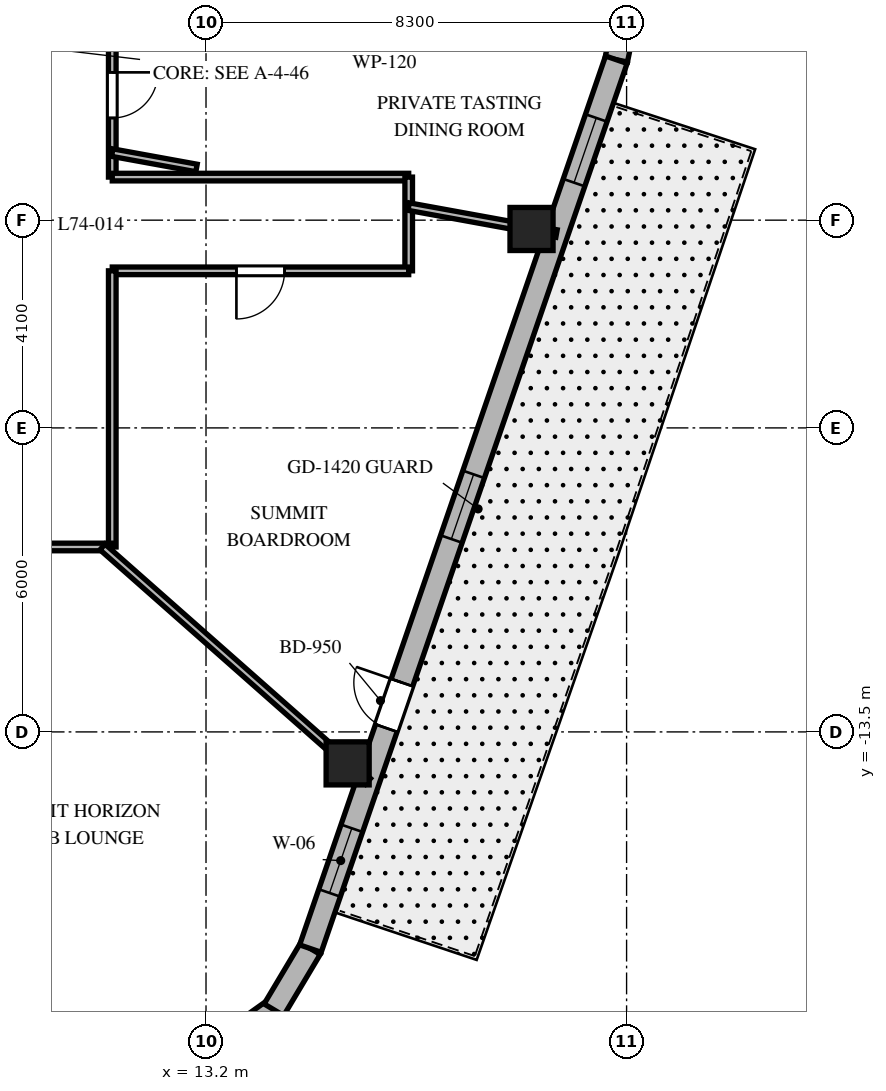
"""IFC4 building model, lengths in metres.
Left out: names, types, materials, properties, quantities, classifications, styles, units other than length and angle.
Written with IfcOpenShell. Run it as: python <this file> out.ifc"""

import sys

from ifc_helpers import new_model, si_unit, direction, frame, frame_2d, origin, origin_2d, place, context, subcontext, project, spatial, rectangle, extrude, element, fill, save


model = new_model("IFC4")
c1 = context("Model", 3, precision=1e-05, world=origin(), true_north=direction((0.0, 1.0)))
c2 = subcontext(c1, "Body", "Model", "MODEL_VIEW")
j1 = project(units=[si_unit("LENGTHUNIT", "METRE"), si_unit("PLANEANGLEUNIT", "RADIAN")], contexts=[c1])
p1 = place(None, origin())
s1 = spatial("IfcSite", under=j1, at=p1, CompositionType="ELEMENT")
p2 = place(p1, origin())
s2 = spatial("IfcBuilding", under=s1, at=p2, CompositionType="ELEMENT")
p3 = place(p2, frame((0.0, 0.0, 297.6)))
s3 = spatial("IfcBuildingStorey", under=s2, at=p3, CompositionType="ELEMENT", Elevation=297.6)
for number, where, z_axis, x_axis in (
    (1, (15.995, -14.121, 0.0), (0.0, 0.0, 1.0), (1.0, 0.0, 0.0)),
    (2, (19.624, -3.574, 0.0), (0.0, 0.0, 1.0), (1.0, 0.0, 0.0)),
):
    element("IfcColumn", number, at=place(p3, frame(where, z_axis=z_axis, x_axis=x_axis)), inside=s3, PredefinedType="COLUMN", context=c2, shape_type="SweptSolid", body=[
        extrude(rectangle(XDim=0.85, YDim=0.85, at=origin_2d()), origin(), (0.0, 0.0, 1.0), 3.9),
    ])
p4 = place(p3, frame((13.415, -19.787, 0.0), z_axis=(0.0, 0.0, 1.0), x_axis=(0.814055493997, 0.580787097561, 0.0)))
e3 = element("IfcWall", 3, at=p4, inside=s3, PredefinedType="SOLIDWALL", context=c2, shape_type="SweptSolid", body=[
    extrude(rectangle(XDim=1.383, YDim=0.45, at=frame_2d((0.691, 0.0))), origin(), (0.0, 0.0, 1.0), 3.6),
])
p5 = place(p3, frame((14.54, -18.984, 0.0), z_axis=(0.0, 0.0, 1.0), x_axis=(0.512374906623, 0.858761873317, 0.0)))
e4 = element("IfcWall", 4, at=p5, inside=s3, PredefinedType="SOLIDWALL", context=c2, shape_type="SweptSolid", body=[
    extrude(rectangle(XDim=1.406, YDim=0.45, at=frame_2d((0.703, 0.0))), origin(), (0.0, 0.0, 1.0), 3.6),
])
p6 = place(p3, frame((21.298, -0.233, 0.0), z_axis=(0.0, 0.0, 1.0), x_axis=(0.199158176661, 0.979967356941, 0.0)))
e5 = element("IfcWall", 5, at=p6, inside=s3, PredefinedType="SOLIDWALL", context=c2, shape_type="SweptSolid", body=[
    extrude(rectangle(XDim=0.895, YDim=0.45, at=frame_2d((0.447, 0.0))), origin(), (0.0, 0.0, 1.0), 3.6),
])
p7 = place(p3, frame((15.26, -17.776, 0.0), z_axis=(0.0, 0.0, 1.0), x_axis=(0.325407437101, 0.945573899745, 0.0)))
e6 = element("IfcWall", 6, at=p7, inside=s3, PredefinedType="SOLIDWALL", context=c2, shape_type="SweptSolid", body=[
    extrude(rectangle(XDim=18.552, YDim=0.45, at=frame_2d((9.276, 0.0))), origin(), (0.0, 0.0, 1.0), 3.6),
])
p8 = place(p7, frame((4.602, 0.0, 0.0)))
e7 = element("IfcOpeningElement", 7, at=p8, cuts=e6, PredefinedType="OPENING", context=c2, shape_type="SweptSolid", body=[
    extrude(rectangle(XDim=0.95, YDim=2.15, at=frame_2d((0.475, 1.075))), frame((0.0, 0.235, 0.0), z_axis=(0.0, -1.0, 0.0), x_axis=(1.0, 0.0, 0.0)), (0.0, 0.0, 1.0), 0.47),
])
p9 = place(p7, frame((1.161, 0.0, 0.8)))
e8 = element("IfcOpeningElement", 8, at=p9, cuts=e6, PredefinedType="OPENING", context=c2, shape_type="SweptSolid", body=[
    extrude(rectangle(XDim=1.35, YDim=1.75, at=frame_2d((0.675, 0.875))), frame((0.0, 0.235, 0.0), z_axis=(0.0, -1.0, 0.0), x_axis=(1.0, 0.0, 0.0)), (0.0, 0.0, 1.0), 0.47),
])
p10 = place(p7, frame((8.548, 0.0, 0.8)))
e9 = element("IfcOpeningElement", 9, at=p10, cuts=e6, PredefinedType="OPENING", context=c2, shape_type="SweptSolid", body=[
    extrude(rectangle(XDim=1.35, YDim=1.75, at=frame_2d((0.675, 0.875))), frame((0.0, 0.235, 0.0), z_axis=(0.0, -1.0, 0.0), x_axis=(1.0, 0.0, 0.0)), (0.0, 0.0, 1.0), 0.47),
])
p11 = place(p7, frame((15.987, 0.0, 0.8)))
e10 = element("IfcOpeningElement", 10, at=p11, cuts=e6, PredefinedType="OPENING", context=c2, shape_type="SweptSolid", body=[
    extrude(rectangle(XDim=1.35, YDim=1.75, at=frame_2d((0.675, 0.875))), frame((0.0, 0.235, 0.0), z_axis=(0.0, -1.0, 0.0), x_axis=(1.0, 0.0, 0.0)), (0.0, 0.0, 1.0), 0.47),
])
p12 = place(p3, frame((11.35, 9.85, 0.0), z_axis=(0.0, 0.0, 1.0), x_axis=(0.0, -1.0, 0.0)))
e11 = element("IfcWall", 11, at=p12, inside=s3, PredefinedType="PARTITIONING", context=c2, shape_type="SweptSolid", body=[
    extrude(rectangle(XDim=12.4, YDim=0.15, at=frame_2d((6.2, 0.0))), origin(), (0.0, 0.0, 1.0), 2.894),
])
p13 = place(p12, frame((7.697, 0.0, 0.0)))
e12 = element("IfcOpeningElement", 12, at=p13, cuts=e11, PredefinedType="OPENING", context=c2, shape_type="SweptSolid", body=[
    extrude(rectangle(XDim=0.95, YDim=2.03, at=frame_2d((0.475, 1.015))), frame((0.0, 0.085, 0.0), z_axis=(0.0, -1.0, 0.0), x_axis=(1.0, 0.0, 0.0)), (0.0, 0.0, 1.0), 0.17),
])
p14 = place(p12, frame((2.998, 0.0, 0.0)))
e13 = element("IfcOpeningElement", 13, at=p14, cuts=e11, PredefinedType="OPENING", context=c2, shape_type="SweptSolid", body=[
    extrude(rectangle(XDim=0.95, YDim=2.03, at=frame_2d((0.475, 1.015))), frame((0.0, 0.085, 0.0), z_axis=(0.0, -1.0, 0.0), x_axis=(1.0, 0.0, 0.0)), (0.0, 0.0, 1.0), 0.17),
])
p15 = place(p12, frame((10.333, 0.0, 0.0)))
e14 = element("IfcOpeningElement", 14, at=p15, cuts=e11, PredefinedType="OPENING", context=c2, shape_type="SweptSolid", body=[
    extrude(rectangle(XDim=0.9, YDim=2.03, at=frame_2d((0.45, 1.015))), frame((0.0, 0.085, 0.0), z_axis=(0.0, -1.0, 0.0), x_axis=(1.0, 0.0, 0.0)), (0.0, 0.0, 1.0), 0.17),
])
p16 = place(p3, frame((11.35, -2.55, 0.0), z_axis=(0.0, 0.0, 1.0), x_axis=(1.0, 0.0, 0.0)))
e15 = element("IfcWall", 15, at=p16, inside=s3, PredefinedType="PARTITIONING", context=c2, shape_type="SweptSolid", body=[
    extrude(rectangle(XDim=5.85, YDim=0.15, at=frame_2d((2.925, 0.0))), origin(), (0.0, 0.0, 1.0), 3.04),
])
p17 = place(p3, frame((17.2, -2.55, 0.0), z_axis=(0.0, 0.0, 1.0), x_axis=(0.0, -1.0, 0.0)))
e16 = element("IfcWall", 16, at=p17, inside=s3, PredefinedType="PARTITIONING", context=c2, shape_type="SweptSolid", body=[
    extrude(rectangle(XDim=1.85, YDim=0.15, at=frame_2d((0.925, 0.0))), origin(), (0.0, 0.0, 1.0), 2.816),
])
p18 = place(p3, frame((17.2, -4.4, 0.0), z_axis=(0.0, 0.0, 1.0), x_axis=(-1.0, 0.0, 0.0)))
e17 = element("IfcWall", 17, at=p18, inside=s3, PredefinedType="PARTITIONING", context=c2, shape_type="SweptSolid", body=[
    extrude(rectangle(XDim=5.85, YDim=0.15, at=frame_2d((2.925, 0.0))), origin(), (0.0, 0.0, 1.0), 2.816),
])
p19 = place(p18, frame((2.45, 0.0, 0.0)))
e18 = element("IfcOpeningElement", 18, at=p19, cuts=e17, PredefinedType="OPENING", context=c2, shape_type="SweptSolid", body=[
    extrude(rectangle(XDim=0.95, YDim=2.03, at=frame_2d((0.475, 1.015))), frame((0.0, 0.085, 0.0), z_axis=(0.0, -1.0, 0.0), x_axis=(1.0, 0.0, 0.0)), (0.0, 0.0, 1.0), 0.17),
])
p20 = place(p3, frame((11.35, -4.4, 0.0), z_axis=(0.0, 0.0, 1.0), x_axis=(0.0, -1.0, 0.0)))
e19 = element("IfcWall", 19, at=p20, inside=s3, PredefinedType="PARTITIONING", context=c2, shape_type="SweptSolid", body=[
    extrude(rectangle(XDim=5.45, YDim=0.15, at=frame_2d((2.725, 0.0))), origin(), (0.0, 0.0, 1.0), 2.816),
])
p21 = place(p3, frame((11.35, -9.85, 0.0), z_axis=(0.0, 0.0, 1.0), x_axis=(-1.0, 0.0, 0.0)))
e20 = element("IfcWall", 20, at=p21, inside=s3, PredefinedType="PARTITIONING", context=c2, shape_type="SweptSolid", body=[
    extrude(rectangle(XDim=10.43, YDim=0.15, at=frame_2d((5.215, 0.0))), origin(), (0.0, 0.0, 1.0), 2.894),
])
p22 = place(p21, frame((8.407, 0.0, 0.0)))
e21 = element("IfcOpeningElement", 21, at=p22, cuts=e20, PredefinedType="OPENING", context=c2, shape_type="SweptSolid", body=[
    extrude(rectangle(XDim=0.9, YDim=2.03, at=frame_2d((0.45, 1.015))), frame((0.0, 0.085, 0.0), z_axis=(0.0, -1.0, 0.0), x_axis=(1.0, 0.0, 0.0)), (0.0, 0.0, 1.0), 0.17),
])
p23 = place(p21, frame((3.416, 0.0, 0.0)))
e22 = element("IfcOpeningElement", 22, at=p23, cuts=e20, PredefinedType="OPENING", context=c2, shape_type="SweptSolid", body=[
    extrude(rectangle(XDim=0.95, YDim=2.03, at=frame_2d((0.475, 1.015))), frame((0.0, 0.085, 0.0), z_axis=(0.0, -1.0, 0.0), x_axis=(1.0, 0.0, 0.0)), (0.0, 0.0, 1.0), 0.17),
])
p24 = place(p3, frame((11.157, -9.85, 0.0), z_axis=(0.0, 0.0, 1.0), x_axis=(0.74966962095, -0.661812253909, 0.0)))
e23 = element("IfcWall", 23, at=p24, inside=s3, PredefinedType="PARTITIONING", context=c2, shape_type="SweptSolid", body=[
    extrude(rectangle(XDim=6.989, YDim=0.15, at=frame_2d((3.494, 0.0))), origin(), (0.0, 0.0, 1.0), 2.94),
])
p25 = place(p3, frame((11.35, -2.067, 0.0), z_axis=(0.0, 0.0, 1.0), x_axis=(0.983807459651, -0.179228575665, 0.0)))
e24 = element("IfcWall", 24, at=p25, inside=s3, PredefinedType="PARTITIONING", context=c2, shape_type="SweptSolid", body=[
    extrude(rectangle(XDim=1.69, YDim=0.15, at=frame_2d((0.845, 0.0))), origin(), (0.0, 0.0, 1.0), 3.6),
])
p26 = place(p3, frame((17.2, -3.133, 0.0), z_axis=(0.0, 0.0, 1.0), x_axis=(0.983817168797, -0.179175272791, 0.0)))
e25 = element("IfcWall", 25, at=p26, inside=s3, PredefinedType="PARTITIONING", context=c2, shape_type="SweptSolid", body=[
    extrude(rectangle(XDim=2.965, YDim=0.15, at=frame_2d((1.482, 0.0))), origin(), (0.0, 0.0, 1.0), 2.816),
])
p27 = place(p8, origin())
e26 = element("IfcDoor", 26, at=p27, inside=s3, OperationType="SINGLE_SWING_RIGHT", PredefinedType="DOOR", context=c2, shape_type="SweptSolid", body=[
    extrude(rectangle(XDim=0.95, YDim=2.15, at=frame_2d((0.475, 1.075))), frame((0.0, 0.025, 0.0), z_axis=(0.0, -1.0, 0.0), x_axis=(1.0, 0.0, 0.0)), (0.0, 0.0, 1.0), 0.05),
])
fill(e7, e26)
p28 = place(p9, origin())
e27 = element("IfcWindow", 27, at=p28, inside=s3, PartitioningType="SINGLE_PANEL", PredefinedType="WINDOW", context=c2, shape_type="SweptSolid", body=[
    extrude(rectangle(XDim=1.35, YDim=1.75, at=frame_2d((0.675, 0.875))), frame((0.0, 0.03, 0.0), z_axis=(0.0, -1.0, 0.0), x_axis=(1.0, 0.0, 0.0)), (0.0, 0.0, 1.0), 0.06),
])
fill(e8, e27)
p29 = place(p10, origin())
e28 = element("IfcWindow", 28, at=p29, inside=s3, PartitioningType="SINGLE_PANEL", PredefinedType="WINDOW", context=c2, shape_type="SweptSolid", body=[
    extrude(rectangle(XDim=1.35, YDim=1.75, at=frame_2d((0.675, 0.875))), frame((0.0, 0.03, 0.0), z_axis=(0.0, -1.0, 0.0), x_axis=(1.0, 0.0, 0.0)), (0.0, 0.0, 1.0), 0.06),
])
fill(e9, e28)
p30 = place(p11, origin())
e29 = element("IfcWindow", 29, at=p30, inside=s3, PartitioningType="SINGLE_PANEL", PredefinedType="WINDOW", context=c2, shape_type="SweptSolid", body=[
    extrude(rectangle(XDim=1.35, YDim=1.75, at=frame_2d((0.675, 0.875))), frame((0.0, 0.03, 0.0), z_axis=(0.0, -1.0, 0.0), x_axis=(1.0, 0.0, 0.0)), (0.0, 0.0, 1.0), 0.06),
])
fill(e10, e29)
p31 = place(p19, origin())
e30 = element("IfcDoor", 30, at=p31, inside=s3, OperationType="SINGLE_SWING_RIGHT", PredefinedType="DOOR", context=c2, shape_type="SweptSolid", body=[
    extrude(rectangle(XDim=0.95, YDim=2.03, at=frame_2d((0.475, 1.015))), frame((0.0, 0.025, 0.0), z_axis=(0.0, -1.0, 0.0), x_axis=(1.0, 0.0, 0.0)), (0.0, 0.0, 1.0), 0.05),
])
fill(e18, e30)
p32 = place(p15, origin())
e31 = element("IfcDoor", 31, at=p32, inside=s3, OperationType="SINGLE_SWING_LEFT", PredefinedType="DOOR", context=c2, shape_type="SweptSolid", body=[
    extrude(rectangle(XDim=0.9, YDim=2.03, at=frame_2d((0.45, 1.015))), frame((0.0, 0.025, 0.0), z_axis=(0.0, -1.0, 0.0), x_axis=(1.0, 0.0, 0.0)), (0.0, 0.0, 1.0), 0.05),
])
fill(e14, e31)
save(model, sys.argv[1])
